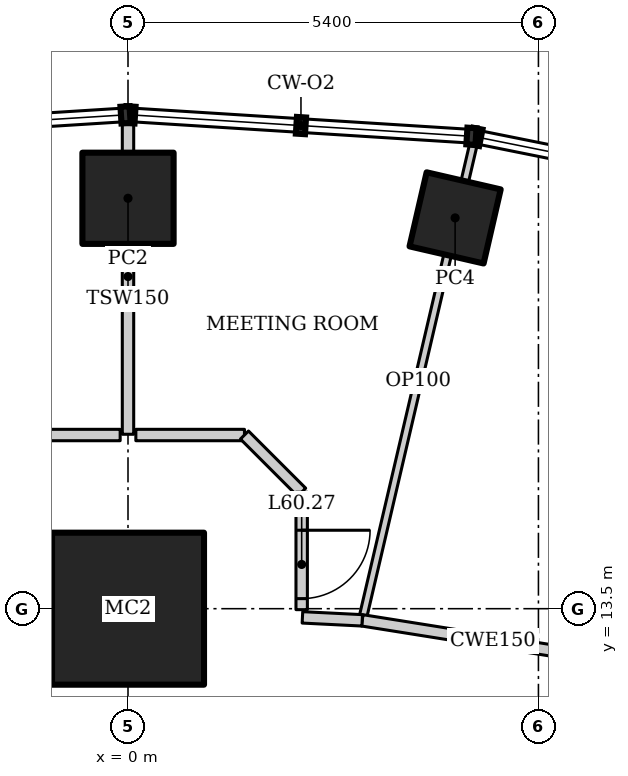
"""IFC4 building model, lengths in metres.
Left out: names, types, materials, properties, quantities, classifications, styles, units other than length and angle.
Written with IfcOpenShell. Run it as: python <this file> out.ifc"""

import sys

from ifc_helpers import new_model, si_unit, direction, frame, frame_2d, origin, origin_2d, place, context, subcontext, project, spatial, rectangle, hollow_rectangle, extrude, element, fill, save


model = new_model("IFC4")
c1 = context("Model", 3, precision=1e-05, world=origin(), true_north=direction((0.0, 1.0)))
c2 = subcontext(c1, "Body", "Model", "MODEL_VIEW")
j1 = project(units=[si_unit("LENGTHUNIT", "METRE"), si_unit("PLANEANGLEUNIT", "RADIAN")], contexts=[c1])
p1 = place(None, origin())
s1 = spatial("IfcSite", under=j1, at=p1, CompositionType="ELEMENT")
p2 = place(p1, origin())
s2 = spatial("IfcBuilding", under=s1, at=p2, CompositionType="ELEMENT")
p3 = place(p2, frame((0.0, 0.0, 257.8)))
s3 = spatial("IfcBuildingStorey", under=s2, at=p3, CompositionType="ELEMENT", Elevation=257.8)
p4 = place(p3, frame((0.0, 13.5, 0.0), z_axis=(0.0, 0.0, 1.0), x_axis=(1.0, 0.0, 0.0)))
e1 = element("IfcColumn", 1, at=p4, inside=s3, PredefinedType="COLUMN", context=c2, shape_type="SweptSolid", body=[
    extrude(hollow_rectangle(XDim=2.0, YDim=2.0, WallThickness=0.17, at=origin_2d()), origin(), (0.0, 0.0, 1.0), 4.2),
])
p5 = place(p3, frame((4.304, 18.642, 0.0), z_axis=(0.0, 0.0, 1.0), x_axis=(0.224951054344, 0.974370064785, 0.0)))
e2 = element("IfcColumn", 2, at=p5, inside=s3, PredefinedType="COLUMN", context=c2, shape_type="SweptSolid", body=[
    extrude(hollow_rectangle(XDim=1.0, YDim=1.0, WallThickness=0.08, at=origin_2d()), origin(), (0.0, 0.0, 1.0), 4.2),
])
p6 = place(p3, frame((0.0, 18.9, 0.0), z_axis=(0.0, 0.0, 1.0), x_axis=(1.0, 0.0, 0.0)))
e3 = element("IfcColumn", 3, at=p6, inside=s3, PredefinedType="COLUMN", context=c2, shape_type="SweptSolid", body=[
    extrude(hollow_rectangle(XDim=1.2, YDim=1.2, WallThickness=0.1, at=origin_2d()), origin(), (0.0, 0.0, 1.0), 4.2),
])
p7 = place(p3, frame((4.556, 19.657, 0.0), z_axis=(0.0, 0.0, 1.0), x_axis=(-0.227524978141, -0.973772244584, 0.0)))
e4 = element("IfcWall", 4, at=p7, inside=s3, PredefinedType="PARTITIONING", context=c2, shape_type="SweptSolid", body=[
    extrude(rectangle(XDim=6.48, YDim=0.1, at=frame_2d((3.24, 0.0))), origin(), (0.0, 0.0, 1.0), 3.108),
])
p8 = place(p3, frame((6.521, 12.799, 0.0), z_axis=(0.0, 0.0, 1.0), x_axis=(-0.987554093087, 0.157279729233, 0.0)))
e5 = element("IfcWall", 5, at=p8, inside=s3, PredefinedType="PARTITIONING", context=c2, shape_type="SweptSolid", body=[
    extrude(rectangle(XDim=3.483, YDim=0.15, at=frame_2d((1.742, 0.0))), origin(), (0.0, 0.0, 1.0), 4.05),
])
p9 = place(p3, frame((0.0, 19.945, 0.0), z_axis=(0.0, 0.0, 1.0), x_axis=(0.0, -1.0, 0.0)))
e6 = element("IfcWall", 6, at=p9, inside=s3, PredefinedType="PARTITIONING", context=c2, shape_type="SweptSolid", body=[
    extrude(rectangle(XDim=4.15, YDim=0.15, at=frame_2d((2.075, 0.0))), origin(), (0.0, 0.0, 1.0), 3.646),
])
p10 = place(p3, frame((3.081, 13.347, 0.0), z_axis=(0.0, 0.0, 1.0), x_axis=(-0.998768524691, 0.049612841959, 0.0)))
e7 = element("IfcWall", 7, at=p10, inside=s3, PredefinedType="PARTITIONING", context=c2, shape_type="SweptSolid", body=[
    extrude(rectangle(XDim=0.787, YDim=0.15, at=frame_2d((0.394, 0.0))), origin(), (0.0, 0.0, 1.0), 4.05),
])
p11 = place(p3, frame((0.103, 15.785, 0.0), z_axis=(0.0, 0.0, 1.0), x_axis=(1.0, 0.0, 0.0)))
e8 = element("IfcWall", 8, at=p11, inside=s3, PredefinedType="PARTITIONING", context=c2, shape_type="SweptSolid", body=[
    extrude(rectangle(XDim=1.429, YDim=0.15, at=frame_2d((0.714, 0.0))), origin(), (0.0, 0.0, 1.0), 4.05),
])
p12 = place(p3, frame((1.532, 15.785, 0.0), z_axis=(0.0, 0.0, 1.0), x_axis=(0.707106781187, -0.707106781187, 0.0)))
e9 = element("IfcWall", 9, at=p12, inside=s3, PredefinedType="PARTITIONING", context=c2, shape_type="SweptSolid", body=[
    extrude(rectangle(XDim=1.064, YDim=0.15, at=frame_2d((0.532, 0.0))), origin(), (0.0, 0.0, 1.0), 4.05),
])
p13 = place(p3, frame((2.285, 15.032, 0.0), z_axis=(0.0, 0.0, 1.0), x_axis=(0.0, -1.0, 0.0)))
e10 = element("IfcWall", 10, at=p13, inside=s3, PredefinedType="PARTITIONING", context=c2, shape_type="SweptSolid", body=[
    extrude(rectangle(XDim=1.545, YDim=0.15, at=frame_2d((0.772, 0.0))), origin(), (0.0, 0.0, 1.0), 4.05),
])
p14 = place(p13, frame((0.5, 0.0, 0.0)))
e11 = element("IfcOpeningElement", 11, at=p14, cuts=e10, PredefinedType="OPENING", context=c2, shape_type="SweptSolid", body=[
    extrude(rectangle(XDim=0.9, YDim=2.1, at=frame_2d((0.45, 1.05))), frame((0.0, 0.085, 0.0), z_axis=(0.0, -1.0, 0.0), x_axis=(1.0, 0.0, 0.0)), (0.0, 0.0, 1.0), 0.17),
])
p15 = place(p3, frame((-1.532, 15.785, 0.0), z_axis=(0.0, 0.0, 1.0), x_axis=(1.0, 0.0, 0.0)))
e12 = element("IfcWall", 12, at=p15, inside=s3, PredefinedType="PARTITIONING", context=c2, shape_type="SweptSolid", body=[
    extrude(rectangle(XDim=1.429, YDim=0.15, at=frame_2d((0.714, 0.0))), origin(), (0.0, 0.0, 1.0), 4.05),
])
p16 = place(p14, origin())
e13 = element("IfcDoor", 13, at=p16, inside=s3, OperationType="SINGLE_SWING_LEFT", PredefinedType="DOOR", context=c2, shape_type="SweptSolid", body=[
    extrude(rectangle(XDim=0.9, YDim=2.1, at=frame_2d((0.45, 1.05))), frame((0.0, 0.025, 0.0), z_axis=(0.0, -1.0, 0.0), x_axis=(1.0, 0.0, 0.0)), (0.0, 0.0, 1.0), 0.05),
])
fill(e11, e13)
save(model, sys.argv[1])
